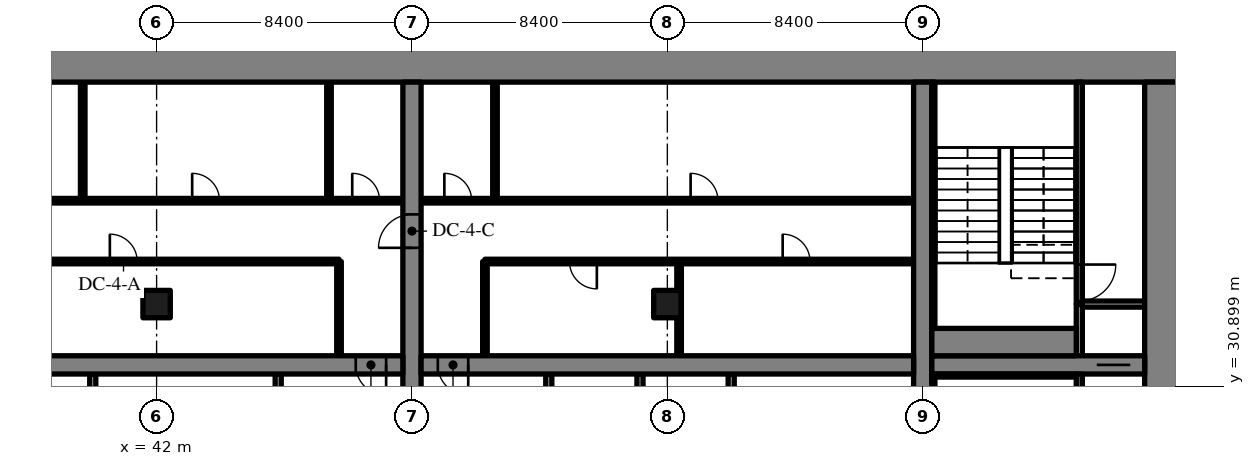
"""IFC4 building model, lengths in metres.
Left out: names, types, materials, properties, quantities, classifications, styles, units other than length and angle.
Written with IfcOpenShell. Run it as: python <this file> out.ifc"""

import sys

from ifc_helpers import new_model, si_unit, direction, frame, frame_2d, origin, origin_2d, place, context, subcontext, project, spatial, rectangle, extrude, source, transform, mapped, element, fill, save


model = new_model("IFC4")
c1 = context("Model", 3, precision=1e-05, world=origin(), true_north=direction((0.0, 1.0)))
c2 = subcontext(c1, "Body", "Model", "MODEL_VIEW")
j1 = project(units=[si_unit("LENGTHUNIT", "METRE"), si_unit("PLANEANGLEUNIT", "RADIAN")], contexts=[c1])
p1 = place(None, origin())
s1 = spatial("IfcSite", under=j1, at=p1, CompositionType="ELEMENT")
p2 = place(p1, origin())
s2 = spatial("IfcBuilding", under=s1, at=p2, CompositionType="ELEMENT")
p3 = place(p2, frame((0.0, 0.0, -13.5)))
s3 = spatial("IfcBuildingStorey", under=s2, at=p3, CompositionType="ELEMENT", Elevation=-13.5)
m1 = source(origin(), c2, "Body", "SweptSolid", [
    extrude(rectangle(XDim=50.4, YDim=1.1, at=frame_2d((25.2, 0.0))), origin(), (0.0, 0.0, 1.0), 4.52),
])
p4 = place(p3, frame((25.2, 41.45, -0.3), z_axis=(0.0, 0.0, 1.0), x_axis=(1.0, 0.0, 0.0)))
e1 = element("IfcWall", 1, at=p4, inside=s3, PredefinedType="SHEAR", context=c2, shape_type="MappedRepresentation", body=[
    mapped(m1, transform((0.0, 0.0, 0.0), scale=1.0)),
])
m2 = source(origin(), c2, "Body", "SweptSolid", [
    extrude(rectangle(XDim=17.8, YDim=1.1, at=frame_2d((8.9, 0.0))), origin(), (0.0, 0.0, 1.0), 4.52),
])
p5 = place(p3, frame((75.05, 23.1, -0.3), z_axis=(0.0, 0.0, 1.0), x_axis=(0.0, 1.0, 0.0)))
e2 = element("IfcWall", 2, at=p5, inside=s3, PredefinedType="SHEAR", context=c2, shape_type="MappedRepresentation", body=[
    mapped(m2, transform((0.0, 0.0, 0.0), scale=1.0)),
])
m3 = source(origin(), c2, "Body", "SweptSolid", [
    extrude(rectangle(XDim=17.8, YDim=0.6, at=frame_2d((8.9, 0.0))), origin(), (0.0, 0.0, 1.0), 4.52),
])
p6 = place(p3, frame((50.4, 23.1, -0.3), z_axis=(0.0, 0.0, 1.0), x_axis=(0.0, 1.0, 0.0)))
e3 = element("IfcWall", 3, at=p6, inside=s3, PredefinedType="SHEAR", context=c2, shape_type="MappedRepresentation", body=[
    mapped(m3, transform((0.0, 0.0, 0.0), scale=1.0)),
])
m4 = source(origin(), c2, "Body", "SweptSolid", [
    extrude(rectangle(XDim=1.1, YDim=2.1, at=frame_2d((0.55, 1.05))), frame((0.0, 0.31, 0.0), z_axis=(0.0, -1.0, 0.0), x_axis=(1.0, 0.0, 0.0)), (0.0, 0.0, 1.0), 0.62),
])
p7 = place(p6, frame((12.35, 0.0, 0.0)))
e4 = element("IfcOpeningElement", 4, at=p7, cuts=e3, PredefinedType="OPENING", context=c2, shape_type="MappedRepresentation", body=[
    mapped(m4, transform((0.0, 0.0, 0.0), scale=1.0)),
])
p8 = place(p3, frame((67.2, 23.1, -0.3), z_axis=(0.0, 0.0, 1.0), x_axis=(0.0, 1.0, 0.0)))
e5 = element("IfcWall", 5, at=p8, inside=s3, PredefinedType="SHEAR", context=c2, shape_type="MappedRepresentation", body=[
    mapped(m3, transform((0.0, 0.0, 0.0), scale=1.0)),
])
m5 = source(origin(), c2, "Body", "SweptSolid", [
    extrude(rectangle(XDim=16.2, YDim=0.6, at=frame_2d((8.1, 0.0))), origin(), (0.0, 0.0, 1.0), 4.52),
])
p9 = place(p3, frame((33.9, 31.6, -0.3), z_axis=(0.0, 0.0, 1.0), x_axis=(1.0, 0.0, 0.0)))
e6 = element("IfcWall", 6, at=p9, inside=s3, PredefinedType="SHEAR", context=c2, shape_type="MappedRepresentation", body=[
    mapped(m5, transform((0.0, 0.0, 0.0), scale=1.0)),
])
m6 = source(origin(), c2, "Body", "SweptSolid", [
    extrude(rectangle(XDim=1.0, YDim=2.1, at=frame_2d((0.5, 1.05))), frame((0.0, 0.31, 0.0), z_axis=(0.0, -1.0, 0.0), x_axis=(1.0, 0.0, 0.0)), (0.0, 0.0, 1.0), 0.62),
])
p10 = place(p9, frame((14.65, 0.0, 0.0)))
e7 = element("IfcOpeningElement", 7, at=p10, cuts=e6, PredefinedType="OPENING", context=c2, shape_type="MappedRepresentation", body=[
    mapped(m6, transform((0.0, 0.0, 0.0), scale=1.0)),
])
m7 = source(origin(), c2, "Body", "SweptSolid", [
    extrude(rectangle(XDim=16.2, YDim=0.6, at=frame_2d((8.1, 0.0))), origin(), (0.0, 0.0, 1.0), 4.52),
])
p11 = place(p3, frame((50.7, 31.6, -0.3), z_axis=(0.0, 0.0, 1.0), x_axis=(1.0, 0.0, 0.0)))
e8 = element("IfcWall", 8, at=p11, inside=s3, PredefinedType="SHEAR", context=c2, shape_type="MappedRepresentation", body=[
    mapped(m7, transform((0.0, 0.0, 0.0), scale=1.0)),
])
p12 = place(p11, frame((0.55, 0.0, 0.0)))
e9 = element("IfcOpeningElement", 9, at=p12, cuts=e8, PredefinedType="OPENING", context=c2, shape_type="MappedRepresentation", body=[
    mapped(m6, transform((0.0, 0.0, 0.0), scale=1.0)),
])
m8 = source(origin(), c2, "Body", "SweptSolid", [
    extrude(rectangle(XDim=7.0, YDim=0.6, at=frame_2d((3.5, 0.0))), origin(), (0.0, 0.0, 1.0), 4.52),
])
p13 = place(p3, frame((67.5, 31.6, -0.3), z_axis=(0.0, 0.0, 1.0), x_axis=(1.0, 0.0, 0.0)))
e10 = element("IfcWall", 10, at=p13, inside=s3, PredefinedType="SHEAR", context=c2, shape_type="MappedRepresentation", body=[
    mapped(m8, transform((0.0, 0.0, 0.0), scale=1.0)),
])
p14 = place(p13, frame((5.425, 0.0, 0.0)))
e11 = element("IfcOpeningElement", 11, at=p14, cuts=e10, PredefinedType="OPENING", context=c2, shape_type="MappedRepresentation", body=[
    mapped(m4, transform((0.0, 0.0, 0.0), scale=1.0)),
])
m9 = source(origin(), c2, "Body", "SweptSolid", [
    extrude(rectangle(XDim=0.9, YDim=0.9, at=origin_2d()), origin(), (0.0, 0.0, 1.0), 4.52),
])
for number, where, z_axis, x_axis in (
    (12, (42.0, 33.6, -0.3), (0.0, 0.0, 1.0), (1.0, 0.0, 0.0)),
    (13, (58.8, 33.6, -0.3), (0.0, 0.0, 1.0), (1.0, 0.0, 0.0)),
):
    element("IfcColumn", number, at=place(p3, frame(where, z_axis=z_axis, x_axis=x_axis)), inside=s3, PredefinedType="COLUMN", context=c2, shape_type="MappedRepresentation", body=[
        mapped(m9, transform((0.0, 0.0, 0.0), scale=1.0)),
    ])
m10 = source(origin(), c2, "Body", "SweptSolid", [
    extrude(rectangle(XDim=2.5, YDim=0.2, at=frame_2d((1.25, 0.0))), origin(), (0.0, 0.0, 1.0), 4.22),
])
p15 = place(p3, frame((46.0, 28.8, 0.0), z_axis=(0.0, 0.0, 1.0), x_axis=(0.0, 1.0, 0.0)))
e14 = element("IfcWall", 14, at=p15, inside=s3, PredefinedType="SOLIDWALL", context=c2, shape_type="MappedRepresentation", body=[
    mapped(m10, transform((0.0, 0.0, 0.0), scale=1.0)),
])
m11 = source(origin(), c2, "Body", "SweptSolid", [
    extrude(rectangle(XDim=2.4, YDim=0.2, at=frame_2d((1.2, 0.0))), origin(), (0.0, 0.0, 1.0), 4.22),
])
p16 = place(p3, frame((39.9, 28.9, 0.0), z_axis=(0.0, 0.0, 1.0), x_axis=(0.0, 1.0, 0.0)))
e15 = element("IfcWall", 15, at=p16, inside=s3, PredefinedType="PARTITIONING", context=c2, shape_type="MappedRepresentation", body=[
    mapped(m11, transform((0.0, 0.0, 0.0), scale=1.0)),
])
m12 = source(origin(), c2, "Body", "SweptSolid", [
    extrude(rectangle(XDim=3.1, YDim=0.15, at=frame_2d((1.55, 0.0))), origin(), (0.0, 0.0, 1.0), 4.22),
])
p17 = place(p3, frame((48.0, 31.9, 0.0), z_axis=(0.0, 0.0, 1.0), x_axis=(0.0, 1.0, 0.0)))
e16 = element("IfcWall", 16, at=p17, inside=s3, PredefinedType="PARTITIONING", context=c2, shape_type="MappedRepresentation", body=[
    mapped(m12, transform((0.0, 0.0, 0.0), scale=1.0)),
])
m13 = source(origin(), c2, "Body", "SweptSolid", [
    extrude(rectangle(XDim=14.1, YDim=0.15, at=frame_2d((7.05, 0.0))), origin(), (0.0, 0.0, 1.0), 4.22),
])
p18 = place(p3, frame((33.9, 35.0, 0.0), z_axis=(0.0, 0.0, 1.0), x_axis=(1.0, 0.0, 0.0)))
e17 = element("IfcWall", 17, at=p18, inside=s3, PredefinedType="PARTITIONING", context=c2, shape_type="MappedRepresentation", body=[
    mapped(m13, transform((0.0, 0.0, 0.0), scale=1.0)),
])
m14 = source(origin(), c2, "Body", "SweptSolid", [
    extrude(rectangle(XDim=0.9, YDim=2.1, at=frame_2d((0.45, 1.05))), frame((0.0, 0.085, 0.0), z_axis=(0.0, -1.0, 0.0), x_axis=(1.0, 0.0, 0.0)), (0.0, 0.0, 1.0), 0.17),
])
p19 = place(p18, frame((6.562, 0.0, 0.0)))
e18 = element("IfcOpeningElement", 18, at=p19, cuts=e17, PredefinedType="OPENING", context=c2, shape_type="MappedRepresentation", body=[
    mapped(m14, transform((0.0, 0.0, 0.0), scale=1.0)),
])
m15 = source(origin(), c2, "Body", "SweptSolid", [
    extrude(rectangle(XDim=16.2, YDim=0.15, at=frame_2d((8.1, 0.0))), origin(), (0.0, 0.0, 1.0), 4.22),
])
p20 = place(p3, frame((33.9, 37.0, 0.0), z_axis=(0.0, 0.0, 1.0), x_axis=(1.0, 0.0, 0.0)))
e19 = element("IfcWall", 19, at=p20, inside=s3, PredefinedType="PARTITIONING", context=c2, shape_type="MappedRepresentation", body=[
    mapped(m15, transform((0.0, 0.0, 0.0), scale=1.0)),
])
p21 = place(p20, frame((0.765, 0.0, 0.0)))
e20 = element("IfcOpeningElement", 20, at=p21, cuts=e19, PredefinedType="OPENING", context=c2, shape_type="MappedRepresentation", body=[
    mapped(m14, transform((0.0, 0.0, 0.0), scale=1.0)),
])
p22 = place(p20, frame((3.6, 0.0, 0.0)))
e21 = element("IfcOpeningElement", 21, at=p22, cuts=e19, PredefinedType="OPENING", context=c2, shape_type="MappedRepresentation", body=[
    mapped(m14, transform((0.0, 0.0, 0.0), scale=1.0)),
])
p23 = place(p20, frame((9.27, 0.0, 0.0)))
e22 = element("IfcOpeningElement", 22, at=p23, cuts=e19, PredefinedType="OPENING", context=c2, shape_type="MappedRepresentation", body=[
    mapped(m14, transform((0.0, 0.0, 0.0), scale=1.0)),
])
p24 = place(p20, frame((14.535, 0.0, 0.0)))
e23 = element("IfcOpeningElement", 23, at=p24, cuts=e19, PredefinedType="OPENING", context=c2, shape_type="MappedRepresentation", body=[
    mapped(m14, transform((0.0, 0.0, 0.0), scale=1.0)),
])
m16 = source(origin(), c2, "Body", "SweptSolid", [
    extrude(rectangle(XDim=3.9, YDim=0.15, at=frame_2d((1.95, 0.0))), origin(), (0.0, 0.0, 1.0), 4.22),
])
for number, where, z_axis, x_axis in (
    (24, (39.57, 37.0, 0.0), (0.0, 0.0, 1.0), (0.0, 1.0, 0.0)),
    (25, (47.67, 37.0, 0.0), (0.0, 0.0, 1.0), (0.0, 1.0, 0.0)),
):
    element("IfcWall", number, at=place(p3, frame(where, z_axis=z_axis, x_axis=x_axis)), inside=s3, PredefinedType="PARTITIONING", context=c2, shape_type="MappedRepresentation", body=[
        mapped(m16, transform((0.0, 0.0, 0.0), scale=1.0)),
    ])
m17 = source(origin(), c2, "Body", "SweptSolid", [
    extrude(rectangle(XDim=8.2, YDim=0.2, at=frame_2d((4.1, 0.0))), origin(), (0.0, 0.0, 1.0), 4.22),
])
for number, where, z_axis, x_axis in (
    (26, (54.9, 23.1, 0.0), (0.0, 0.0, 1.0), (0.0, 1.0, 0.0)),
    (27, (60.9, 23.1, 0.0), (0.0, 0.0, 1.0), (0.0, 1.0, 0.0)),
    (28, (57.9, 23.1, 0.0), (0.0, 0.0, 1.0), (0.0, 1.0, 0.0)),
):
    element("IfcWall", number, at=place(p3, frame(where, z_axis=z_axis, x_axis=x_axis)), inside=s3, PredefinedType="PARTITIONING", context=c2, shape_type="MappedRepresentation", body=[
        mapped(m17, transform((0.0, 0.0, 0.0), scale=1.0)),
    ])
p25 = place(p3, frame((52.8, 31.9, 0.0), z_axis=(0.0, 0.0, 1.0), x_axis=(0.0, 1.0, 0.0)))
e29 = element("IfcWall", 29, at=p25, inside=s3, PredefinedType="PARTITIONING", context=c2, shape_type="MappedRepresentation", body=[
    mapped(m12, transform((0.0, 0.0, 0.0), scale=1.0)),
])
m18 = source(origin(), c2, "Body", "SweptSolid", [
    extrude(rectangle(XDim=14.1, YDim=0.15, at=frame_2d((7.05, 0.0))), origin(), (0.0, 0.0, 1.0), 4.22),
])
p26 = place(p3, frame((66.9, 35.0, 0.0), z_axis=(0.0, 0.0, 1.0), x_axis=(-1.0, 0.0, 0.0)))
e30 = element("IfcWall", 30, at=p26, inside=s3, PredefinedType="PARTITIONING", context=c2, shape_type="MappedRepresentation", body=[
    mapped(m18, transform((0.0, 0.0, 0.0), scale=1.0)),
])
p27 = place(p26, frame((3.407, 0.0, 0.0)))
e31 = element("IfcOpeningElement", 31, at=p27, cuts=e30, PredefinedType="OPENING", context=c2, shape_type="MappedRepresentation", body=[
    mapped(m14, transform((0.0, 0.0, 0.0), scale=1.0)),
])
p28 = place(p26, frame((10.419, 0.0, 0.0)))
e32 = element("IfcOpeningElement", 32, at=p28, cuts=e30, PredefinedType="OPENING", context=c2, shape_type="MappedRepresentation", body=[
    mapped(m14, transform((0.0, 0.0, 0.0), scale=1.0)),
])
m19 = source(origin(), c2, "Body", "SweptSolid", [
    extrude(rectangle(XDim=16.2, YDim=0.15, at=frame_2d((8.1, 0.0))), origin(), (0.0, 0.0, 1.0), 4.22),
])
p29 = place(p3, frame((66.9, 37.0, 0.0), z_axis=(0.0, 0.0, 1.0), x_axis=(-1.0, 0.0, 0.0)))
e33 = element("IfcWall", 33, at=p29, inside=s3, PredefinedType="PARTITIONING", context=c2, shape_type="MappedRepresentation", body=[
    mapped(m19, transform((0.0, 0.0, 0.0), scale=1.0)),
])
p30 = place(p29, frame((6.435, 0.0, 0.0)))
e34 = element("IfcOpeningElement", 34, at=p30, cuts=e33, PredefinedType="OPENING", context=c2, shape_type="MappedRepresentation", body=[
    mapped(m14, transform((0.0, 0.0, 0.0), scale=1.0)),
])
p31 = place(p29, frame((14.535, 0.0, 0.0)))
e35 = element("IfcOpeningElement", 35, at=p31, cuts=e33, PredefinedType="OPENING", context=c2, shape_type="MappedRepresentation", body=[
    mapped(m14, transform((0.0, 0.0, 0.0), scale=1.0)),
])
p32 = place(p3, frame((59.186, 31.9, 0.0), z_axis=(0.0, 0.0, 1.0), x_axis=(0.0, 1.0, 0.0)))
e36 = element("IfcWall", 36, at=p32, inside=s3, PredefinedType="PARTITIONING", context=c2, shape_type="MappedRepresentation", body=[
    mapped(m12, transform((0.0, 0.0, 0.0), scale=1.0)),
])
p33 = place(p3, frame((53.13, 37.0, 0.0), z_axis=(0.0, 0.0, 1.0), x_axis=(0.0, 1.0, 0.0)))
e37 = element("IfcWall", 37, at=p33, inside=s3, PredefinedType="PARTITIONING", context=c2, shape_type="MappedRepresentation", body=[
    mapped(m16, transform((0.0, 0.0, 0.0), scale=1.0)),
])
m20 = source(origin(), c2, "Body", "SweptSolid", [
    extrude(rectangle(XDim=8.2, YDim=0.2, at=frame_2d((4.1, 0.0))), origin(), (0.0, 0.0, 1.0), 4.52),
])
p34 = place(p3, frame((72.35, 23.1, -0.3), z_axis=(0.0, 0.0, 1.0), x_axis=(0.0, 1.0, 0.0)))
e38 = element("IfcWall", 38, at=p34, inside=s3, PredefinedType="SOLIDWALL", context=c2, shape_type="MappedRepresentation", body=[
    mapped(m20, transform((0.0, 0.0, 0.0), scale=1.0)),
])
m21 = source(origin(), c2, "Body", "SweptSolid", [
    extrude(rectangle(XDim=1.2, YDim=2.1, at=frame_2d((0.6, 1.05))), frame((0.0, 0.11, 0.0), z_axis=(0.0, -1.0, 0.0), x_axis=(1.0, 0.0, 0.0)), (0.0, 0.0, 1.0), 0.22),
])
p35 = place(p34, frame((0.5, 0.0, 0.0)))
e39 = element("IfcOpeningElement", 39, at=p35, cuts=e38, PredefinedType="OPENING", context=c2, shape_type="MappedRepresentation", body=[
    mapped(m21, transform((0.0, 0.0, 0.0), scale=1.0)),
])
m22 = source(origin(), c2, "Body", "SweptSolid", [
    extrude(rectangle(XDim=1.7, YDim=0.2, at=frame_2d((0.85, 0.0))), origin(), (0.0, 0.0, 1.0), 4.22),
])
p36 = place(p3, frame((72.35, 31.9, 0.0), z_axis=(0.0, 0.0, 1.0), x_axis=(0.0, 1.0, 0.0)))
e40 = element("IfcWall", 40, at=p36, inside=s3, PredefinedType="SOLIDWALL", context=c2, shape_type="MappedRepresentation", body=[
    mapped(m22, transform((0.0, 0.0, 0.0), scale=1.0)),
])
m23 = source(origin(), c2, "Body", "SweptSolid", [
    extrude(rectangle(XDim=2.05, YDim=0.2, at=frame_2d((1.025, 0.0))), origin(), (0.0, 0.0, 1.0), 4.22),
])
p37 = place(p3, frame((72.45, 33.6, 0.0), z_axis=(0.0, 0.0, 1.0), x_axis=(1.0, 0.0, 0.0)))
e41 = element("IfcWall", 41, at=p37, inside=s3, PredefinedType="SOLIDWALL", context=c2, shape_type="MappedRepresentation", body=[
    mapped(m23, transform((0.0, 0.0, 0.0), scale=1.0)),
])
m24 = source(origin(), c2, "Body", "SweptSolid", [
    extrude(rectangle(XDim=7.3, YDim=0.2, at=frame_2d((3.65, 0.0))), origin(), (0.0, 0.0, 1.0), 4.52),
])
p38 = place(p3, frame((72.35, 33.6, -0.3), z_axis=(0.0, 0.0, 1.0), x_axis=(0.0, 1.0, 0.0)))
e42 = element("IfcWall", 42, at=p38, inside=s3, PredefinedType="SOLIDWALL", context=c2, shape_type="MappedRepresentation", body=[
    mapped(m24, transform((0.0, 0.0, 0.0), scale=1.0)),
])
p39 = place(p38, frame((0.1, 0.0, 0.0)))
e43 = element("IfcOpeningElement", 43, at=p39, cuts=e42, PredefinedType="OPENING", context=c2, shape_type="MappedRepresentation", body=[
    mapped(m21, transform((0.0, 0.0, 0.0), scale=1.0)),
])
m25 = source(origin(), c2, "Body", "SweptSolid", [
    extrude(rectangle(XDim=4.75, YDim=0.1, at=frame_2d((2.375, 0.0))), origin(), (0.0, 0.0, 1.0), 4.52),
])
p40 = place(p3, frame((67.5, 31.25, -0.3), z_axis=(0.0, 0.0, 1.0), x_axis=(1.0, 0.0, 0.0)))
e44 = element("IfcWall", 44, at=p40, inside=s3, PredefinedType="SOLIDWALL", context=c2, shape_type="MappedRepresentation", body=[
    mapped(m25, transform((0.0, 0.0, 0.0), scale=1.0)),
])
m26 = source(origin(), c2, "Body", "SweptSolid", [
    extrude(rectangle(XDim=8.1, YDim=0.1, at=frame_2d((4.05, 0.0))), origin(), (0.0, 0.0, 1.0), 4.52),
])
p41 = place(p3, frame((67.55, 23.1, -0.3), z_axis=(0.0, 0.0, 1.0), x_axis=(0.0, 1.0, 0.0)))
e45 = element("IfcWall", 45, at=p41, inside=s3, PredefinedType="SOLIDWALL", context=c2, shape_type="MappedRepresentation", body=[
    mapped(m26, transform((0.0, 0.0, 0.0), scale=1.0)),
])
m27 = source(origin(), c2, "Body", "SweptSolid", [
    extrude(rectangle(XDim=4.75, YDim=0.9, at=frame_2d((2.375, 0.0))), origin(), (0.0, 0.0, 1.0), 4.52),
])
p42 = place(p3, frame((67.5, 32.35, -0.3), z_axis=(0.0, 0.0, 1.0), x_axis=(1.0, 0.0, 0.0)))
e46 = element("IfcWall", 46, at=p42, inside=s3, PredefinedType="SOLIDWALL", context=c2, shape_type="MappedRepresentation", body=[
    mapped(m27, transform((0.0, 0.0, 0.0), scale=1.0)),
])
p43 = place(p3, frame((67.55, 32.8, -0.3), z_axis=(0.0, 0.0, 1.0), x_axis=(0.0, 1.0, 0.0)))
e47 = element("IfcWall", 47, at=p43, inside=s3, PredefinedType="SOLIDWALL", context=c2, shape_type="MappedRepresentation", body=[
    mapped(m26, transform((0.0, 0.0, 0.0), scale=1.0)),
])
m28 = source(origin(), c2, "Body", "SweptSolid", [
    extrude(rectangle(XDim=1.0, YDim=2.1, at=frame_2d((0.5, 1.05))), frame((0.0, 0.025, 0.0), z_axis=(0.0, -1.0, 0.0), x_axis=(1.0, 0.0, 0.0)), (0.0, 0.0, 1.0), 0.05),
])
p44 = place(p10, origin())
e48 = element("IfcDoor", 48, at=p44, inside=s3, OperationType="SINGLE_SWING_RIGHT", PredefinedType="DOOR", context=c2, shape_type="MappedRepresentation", body=[
    mapped(m28, transform((0.0, 0.0, 0.0), scale=1.0)),
])
fill(e7, e48)
m29 = source(origin(), c2, "Body", "SweptSolid", [
    extrude(rectangle(XDim=0.9, YDim=2.1, at=frame_2d((0.45, 1.05))), frame((0.0, 0.025, 0.0), z_axis=(0.0, -1.0, 0.0), x_axis=(1.0, 0.0, 0.0)), (0.0, 0.0, 1.0), 0.05),
])
p45 = place(p19, origin())
e49 = element("IfcDoor", 49, at=p45, inside=s3, OperationType="SINGLE_SWING_LEFT", PredefinedType="DOOR", context=c2, shape_type="MappedRepresentation", body=[
    mapped(m29, transform((0.0, 0.0, 0.0), scale=1.0)),
])
fill(e18, e49)
p46 = place(p23, origin())
e50 = element("IfcDoor", 50, at=p46, inside=s3, OperationType="SINGLE_SWING_LEFT", PredefinedType="DOOR", context=c2, shape_type="MappedRepresentation", body=[
    mapped(m29, transform((0.0, 0.0, 0.0), scale=1.0)),
])
fill(e22, e50)
p47 = place(p24, origin())
e51 = element("IfcDoor", 51, at=p47, inside=s3, OperationType="SINGLE_SWING_LEFT", PredefinedType="DOOR", context=c2, shape_type="MappedRepresentation", body=[
    mapped(m29, transform((0.0, 0.0, 0.0), scale=1.0)),
])
fill(e23, e51)
p48 = place(p12, origin())
e52 = element("IfcDoor", 52, at=p48, inside=s3, OperationType="SINGLE_SWING_RIGHT", PredefinedType="DOOR", context=c2, shape_type="MappedRepresentation", body=[
    mapped(m28, transform((0.0, 0.0, 0.0), scale=1.0)),
])
fill(e9, e52)
p49 = place(p27, origin())
e53 = element("IfcDoor", 53, at=p49, inside=s3, OperationType="SINGLE_SWING_RIGHT", PredefinedType="DOOR", context=c2, shape_type="MappedRepresentation", body=[
    mapped(m29, transform((0.0, 0.0, 0.0), scale=1.0)),
])
fill(e31, e53)
p50 = place(p28, origin())
e54 = element("IfcDoor", 54, at=p50, inside=s3, OperationType="SINGLE_SWING_LEFT", PredefinedType="DOOR", context=c2, shape_type="MappedRepresentation", body=[
    mapped(m29, transform((0.0, 0.0, 0.0), scale=1.0)),
])
fill(e32, e54)
p51 = place(p30, origin())
e55 = element("IfcDoor", 55, at=p51, inside=s3, OperationType="SINGLE_SWING_RIGHT", PredefinedType="DOOR", context=c2, shape_type="MappedRepresentation", body=[
    mapped(m29, transform((0.0, 0.0, 0.0), scale=1.0)),
])
fill(e34, e55)
p52 = place(p31, origin())
e56 = element("IfcDoor", 56, at=p52, inside=s3, OperationType="SINGLE_SWING_RIGHT", PredefinedType="DOOR", context=c2, shape_type="MappedRepresentation", body=[
    mapped(m29, transform((0.0, 0.0, 0.0), scale=1.0)),
])
fill(e35, e56)
m30 = source(origin(), c2, "Body", "SweptSolid", [
    extrude(rectangle(XDim=1.1, YDim=2.1, at=frame_2d((0.55, 1.05))), frame((0.0, 0.025, 0.0), z_axis=(0.0, -1.0, 0.0), x_axis=(1.0, 0.0, 0.0)), (0.0, 0.0, 1.0), 0.05),
])
p53 = place(p14, origin())
e57 = element("IfcDoor", 57, at=p53, inside=s3, OperationType="SLIDING_TO_RIGHT", PredefinedType="DOOR", context=c2, shape_type="MappedRepresentation", body=[
    mapped(m30, transform((0.0, 0.0, 0.0), scale=1.0)),
])
fill(e11, e57)
m31 = source(origin(), c2, "Body", "SweptSolid", [
    extrude(rectangle(XDim=1.2, YDim=2.1, at=frame_2d((0.6, 1.05))), frame((0.0, 0.025, 0.0), z_axis=(0.0, -1.0, 0.0), x_axis=(1.0, 0.0, 0.0)), (0.0, 0.0, 1.0), 0.05),
])
p54 = place(p39, origin())
e58 = element("IfcDoor", 58, at=p54, inside=s3, OperationType="SINGLE_SWING_RIGHT", PredefinedType="DOOR", context=c2, shape_type="MappedRepresentation", body=[
    mapped(m31, transform((0.0, 0.0, 0.0), scale=1.0)),
])
fill(e43, e58)
p55 = place(p7, origin())
e59 = element("IfcDoor", 59, at=p55, inside=s3, OperationType="SINGLE_SWING_LEFT", PredefinedType="DOOR", context=c2, shape_type="MappedRepresentation", body=[
    mapped(m30, transform((0.0, 0.0, 0.0), scale=1.0)),
])
fill(e4, e59)
save(model, sys.argv[1])
